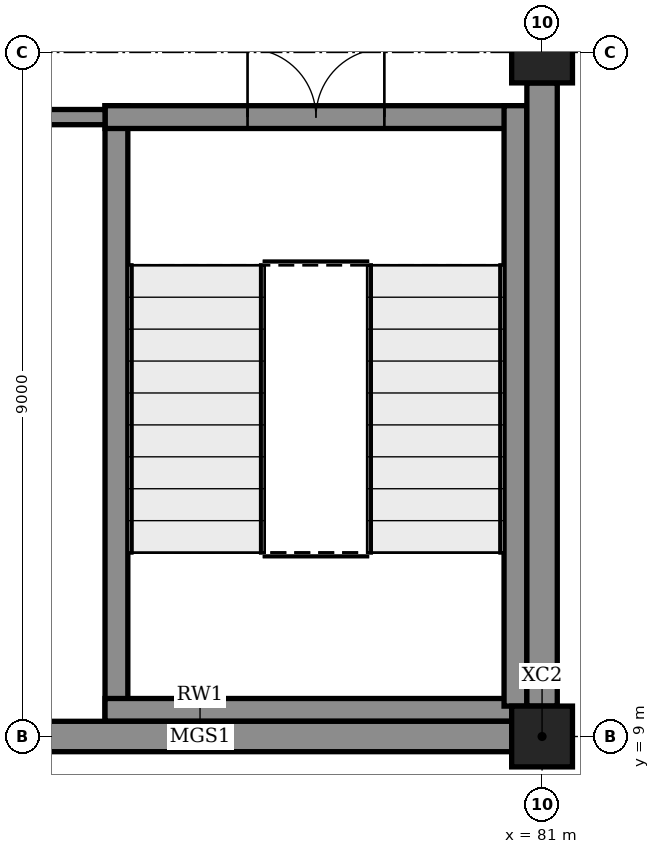
"""IFC4 building model, lengths in metres.
Left out: names, types, materials, properties, quantities, classifications, styles, units other than length and angle.
Written with IfcOpenShell. Run it as: python <this file> out.ifc"""

import sys

from ifc_helpers import new_model, si_unit, direction, frame, frame_2d, origin, origin_2d, place, context, subcontext, project, spatial, rectangle, extrude, element, fill, save


model = new_model("IFC4")
c1 = context("Model", 3, precision=1e-05, world=origin(), true_north=direction((0.0, 1.0)))
c2 = subcontext(c1, "Body", "Model", "MODEL_VIEW")
j1 = project(units=[si_unit("LENGTHUNIT", "METRE"), si_unit("PLANEANGLEUNIT", "RADIAN")], contexts=[c1])
p1 = place(None, origin())
s1 = spatial("IfcSite", under=j1, at=p1, CompositionType="ELEMENT")
p2 = place(p1, origin())
s2 = spatial("IfcBuilding", under=s1, at=p2, CompositionType="ELEMENT")
p3 = place(p2, origin())
s3 = spatial("IfcBuildingStorey", under=s2, at=p3, CompositionType="ELEMENT", Elevation=0.0)
for number, where, z_axis, x_axis in (
    (1, (81.0, 9.0, -0.3), (0.0, 0.0, 1.0), (1.0, 0.0, 0.0)),
    (2, (81.0, 18.0, -0.3), (0.0, 0.0, 1.0), (1.0, 0.0, 0.0)),
):
    element("IfcColumn", number, at=place(p3, frame(where, z_axis=z_axis, x_axis=x_axis)), inside=s3, PredefinedType="COLUMN", context=c2, shape_type="SweptSolid", body=[
        extrude(rectangle(XDim=0.8, YDim=0.8, at=origin_2d()), origin(), (0.0, 0.0, 1.0), 6.3),
    ])
for number, where, z_axis, x_axis in (
    (3, (72.4, 9.0, 0.0), (0.0, 0.0, 1.0), (1.0, 0.0, 0.0)),
    (4, (81.0, 9.4, 0.0), (0.0, 0.0, 1.0), (0.0, 1.0, 0.0)),
):
    element("IfcWall", number, at=place(p3, frame(where, z_axis=z_axis, x_axis=x_axis)), inside=s3, PredefinedType="SOLIDWALL", context=c2, shape_type="SweptSolid", body=[
        extrude(rectangle(XDim=8.2, YDim=0.4, at=frame_2d((4.1, 0.0))), origin(), (0.0, 0.0, 1.0), 4.82),
    ])
p4 = place(p3, frame((80.6, 9.35, 0.0), z_axis=(0.0, 0.0, 1.0), x_axis=(-1.0, 0.0, 0.0)))
e5 = element("IfcWall", 5, at=p4, inside=s3, PredefinedType="SOLIDWALL", context=c2, shape_type="SweptSolid", body=[
    extrude(rectangle(XDim=5.35, YDim=0.3, at=frame_2d((2.675, 0.0))), origin(), (0.0, 0.0, 1.0), 5.72),
])
p5 = place(p3, frame((80.8, 17.15, 0.0), z_axis=(0.0, 0.0, 1.0), x_axis=(-1.0, 0.0, 0.0)))
e6 = element("IfcWall", 6, at=p5, inside=s3, PredefinedType="SOLIDWALL", context=c2, shape_type="SweptSolid", body=[
    extrude(rectangle(XDim=5.55, YDim=0.3, at=frame_2d((2.775, 0.0))), origin(), (0.0, 0.0, 1.0), 5.72),
])
p6 = place(p5, frame((1.875, 0.0, 0.0)))
e7 = element("IfcOpeningElement", 7, at=p6, cuts=e6, PredefinedType="OPENING", context=c2, shape_type="SweptSolid", body=[
    extrude(rectangle(XDim=1.8, YDim=2.4, at=frame_2d((0.9, 1.2))), frame((0.0, 0.16, 0.0), z_axis=(0.0, -1.0, 0.0), x_axis=(1.0, 0.0, 0.0)), (0.0, 0.0, 1.0), 0.32),
])
p7 = place(p3, frame((80.65, 9.4, 0.0), z_axis=(0.0, 0.0, 1.0), x_axis=(0.0, 1.0, 0.0)))
e8 = element("IfcWall", 8, at=p7, inside=s3, PredefinedType="SOLIDWALL", context=c2, shape_type="SweptSolid", body=[
    extrude(rectangle(XDim=7.9, YDim=0.3, at=frame_2d((3.95, 0.0))), origin(), (0.0, 0.0, 1.0), 5.72),
])
p8 = place(p3, frame((75.4, 9.2, 0.0), z_axis=(0.0, 0.0, 1.0), x_axis=(0.0, 1.0, 0.0)))
e9 = element("IfcWall", 9, at=p8, inside=s3, PredefinedType="SOLIDWALL", context=c2, shape_type="SweptSolid", body=[
    extrude(rectangle(XDim=8.1, YDim=0.3, at=frame_2d((4.05, 0.0))), origin(), (0.0, 0.0, 1.0), 5.72),
])
p9 = place(p3, frame((75.25, 17.15, 0.0), z_axis=(0.0, 0.0, 1.0), x_axis=(-1.0, 0.0, 0.0)))
e10 = element("IfcWall", 10, at=p9, inside=s3, PredefinedType="PARTITIONING", context=c2, shape_type="SweptSolid", body=[
    extrude(rectangle(XDim=6.85, YDim=0.2, at=frame_2d((3.425, 0.0))), origin(), (0.0, 0.0, 1.0), 5.72),
])
p10 = place(p9, frame((1.15, 0.0, 0.0)))
e11 = element("IfcOpeningElement", 11, at=p10, cuts=e10, PredefinedType="OPENING", context=c2, shape_type="SweptSolid", body=[
    extrude(rectangle(XDim=0.9, YDim=2.1, at=frame_2d((0.45, 1.05))), frame((0.0, 0.11, 0.0), z_axis=(0.0, -1.0, 0.0), x_axis=(1.0, 0.0, 0.0)), (0.0, 0.0, 1.0), 0.22),
])
p11 = place(p6, frame((1.8, 0.0, 0.0), z_axis=(0.0, 0.0, 1.0), x_axis=(-1.0, 0.0, 0.0)))
e12 = element("IfcDoor", 12, at=p11, inside=s3, OperationType="DOUBLE_DOOR_SINGLE_SWING", PredefinedType="DOOR", context=c2, shape_type="SweptSolid", body=[
    extrude(rectangle(XDim=1.8, YDim=2.4, at=frame_2d((0.9, 1.2))), frame((0.0, 0.025, 0.0), z_axis=(0.0, -1.0, 0.0), x_axis=(1.0, 0.0, 0.0)), (0.0, 0.0, 1.0), 0.05),
])
fill(e7, e12)
save(model, sys.argv[1])
